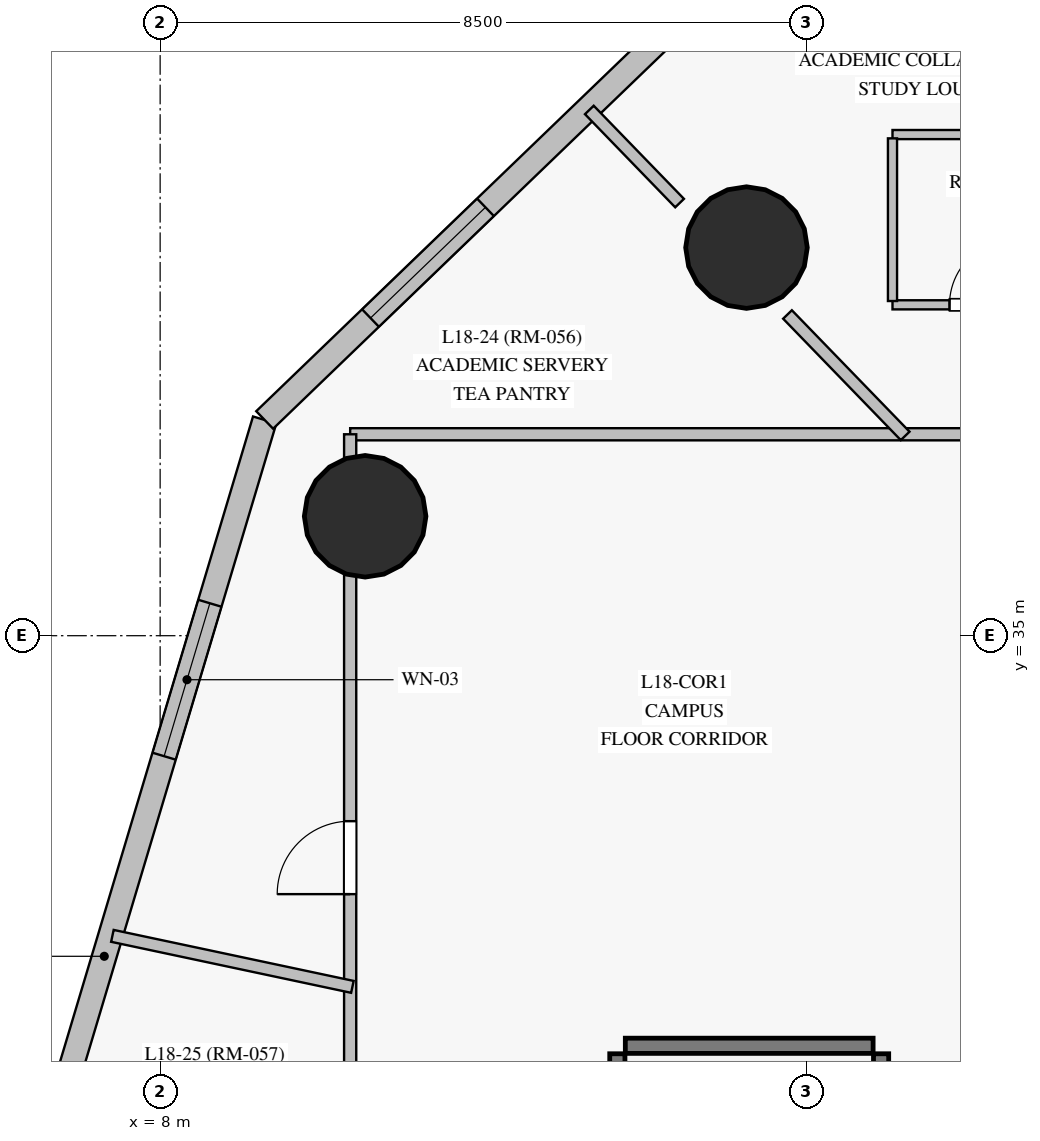
"""IFC4 building model, lengths in metres.
Left out: names, types, materials, properties, quantities, classifications, styles, units other than length and angle.
Written with IfcOpenShell. Run it as: python <this file> out.ifc"""

import sys

from ifc_helpers import new_model, si_unit, direction, frame, frame_2d, origin, origin_with_axes, origin_2d, place, context, subcontext, project, spatial, rectangle, circle, extrude, source, transform, mapped, element, fill, save


model = new_model("IFC4")
c1 = context("Model", 3, precision=1e-05, world=origin(), true_north=direction((0.0, 1.0)))
c2 = subcontext(c1, "Body", "Model", "MODEL_VIEW")
j1 = project(units=[si_unit("LENGTHUNIT", "METRE"), si_unit("PLANEANGLEUNIT", "RADIAN")], contexts=[c1])
p1 = place(None, origin())
s1 = spatial("IfcSite", under=j1, at=p1, CompositionType="ELEMENT")
p2 = place(p1, origin())
s2 = spatial("IfcBuilding", under=s1, at=p2, CompositionType="ELEMENT")
p3 = place(p2, frame((0.0, 0.0, 69.7)))
s3 = spatial("IfcBuildingStorey", under=s2, at=p3, CompositionType="ELEMENT", Elevation=69.7)
m1 = source(origin_with_axes(), c2, "Body", "SweptSolid", [
    extrude(circle(Radius=0.8, at=origin_2d()), origin(), (0.0, 0.0, 1.0), 3.6),
])
for number, where, z_axis, x_axis in (
    (1, (15.714, 40.106, 0.0), (0.0, 0.0, 1.0), (1.0, 0.0, 0.0)),
    (2, (10.697, 36.571, 0.0), (0.0, 0.0, 1.0), (1.0, 0.0, 0.0)),
):
    element("IfcColumn", number, at=place(p3, frame(where, z_axis=z_axis, x_axis=x_axis)), inside=s3, PredefinedType="COLUMN", context=c2, shape_type="MappedRepresentation", body=[
        mapped(m1, transform((0.0, 0.0, 0.0), scale=1.0)),
    ])
p4 = place(p3, frame((9.375, 37.838, 0.0), z_axis=(0.0, 0.0, 1.0), x_axis=(-0.286532715345, -0.958070458284, 0.0)))
e3 = element("IfcWall", 3, at=p4, inside=s3, PredefinedType="SOLIDWALL", context=c2, shape_type="SweptSolid", body=[
    extrude(rectangle(XDim=14.729, YDim=0.32, at=frame_2d((7.365, 0.0))), origin(), (0.0, 0.0, 1.0), 3.35),
])
p5 = place(p4, frame((2.517, 0.0, 0.85)))
e4 = element("IfcOpeningElement", 4, at=p5, cuts=e3, PredefinedType="OPENING", context=c2, shape_type="SweptSolid", body=[
    extrude(rectangle(XDim=2.1, YDim=1.95, at=frame_2d((1.05, 0.975))), frame((0.0, 0.17, 0.0), z_axis=(0.0, -1.0, 0.0), x_axis=(1.0, 0.0, 0.0)), (0.0, 0.0, 1.0), 0.34),
])
p6 = place(p4, frame((9.458, 0.0, 0.85)))
e5 = element("IfcOpeningElement", 5, at=p6, cuts=e3, PredefinedType="OPENING", context=c2, shape_type="SweptSolid", body=[
    extrude(rectangle(XDim=2.1, YDim=1.95, at=frame_2d((1.05, 0.975))), frame((0.0, 0.17, 0.0), z_axis=(0.0, -1.0, 0.0), x_axis=(1.0, 0.0, 0.0)), (0.0, 0.0, 1.0), 0.34),
])
p7 = place(p3, frame((17.891, 46.039, 0.0), z_axis=(0.0, 0.0, 1.0), x_axis=(-0.720301487299, -0.693661132971, 0.0)))
e6 = element("IfcWall", 6, at=p7, inside=s3, PredefinedType="SOLIDWALL", context=c2, shape_type="SweptSolid", body=[
    extrude(rectangle(XDim=11.822, YDim=0.32, at=frame_2d((5.911, 0.0))), origin(), (0.0, 0.0, 1.0), 3.35),
])
p8 = place(p7, frame((1.938, 0.0, 0.85)))
e7 = element("IfcOpeningElement", 7, at=p8, cuts=e6, PredefinedType="OPENING", context=c2, shape_type="SweptSolid", body=[
    extrude(rectangle(XDim=2.1, YDim=1.95, at=frame_2d((1.05, 0.975))), frame((0.0, 0.17, 0.0), z_axis=(0.0, -1.0, 0.0), x_axis=(1.0, 0.0, 0.0)), (0.0, 0.0, 1.0), 0.34),
])
p9 = place(p7, frame((7.789, 0.0, 0.85)))
e8 = element("IfcOpeningElement", 8, at=p9, cuts=e6, PredefinedType="OPENING", context=c2, shape_type="SweptSolid", body=[
    extrude(rectangle(XDim=2.1, YDim=1.95, at=frame_2d((1.05, 0.975))), frame((0.0, 0.17, 0.0), z_axis=(0.0, -1.0, 0.0), x_axis=(1.0, 0.0, 0.0)), (0.0, 0.0, 1.0), 0.34),
])
p10 = place(p3, frame((14.015, 22.15, 0.0), z_axis=(0.0, 0.0, 1.0), x_axis=(0.0, 1.0, 0.0)))
e9 = element("IfcWall", 9, at=p10, inside=s3, PredefinedType="SHEAR", context=c2, shape_type="SweptSolid", body=[
    extrude(rectangle(XDim=7.35, YDim=0.2, at=frame_2d((3.675, 0.0))), origin(), (0.0, 0.0, 1.0), 3.35),
])
p11 = place(p3, frame((17.485, 22.15, 0.0), z_axis=(0.0, 0.0, 1.0), x_axis=(0.0, 1.0, 0.0)))
e10 = element("IfcWall", 10, at=p11, inside=s3, PredefinedType="SHEAR", context=c2, shape_type="SweptSolid", body=[
    extrude(rectangle(XDim=7.35, YDim=0.2, at=frame_2d((3.675, 0.0))), origin(), (0.0, 0.0, 1.0), 3.35),
])
p12 = place(p11, frame((0.35, 0.0, 0.0)))
e11 = element("IfcOpeningElement", 11, at=p12, cuts=e10, PredefinedType="OPENING", context=c2, shape_type="SweptSolid", body=[
    extrude(rectangle(XDim=1.15, YDim=2.15, at=frame_2d((0.575, 1.075))), frame((0.0, 0.11, 0.0), z_axis=(0.0, -1.0, 0.0), x_axis=(1.0, 0.0, 0.0)), (0.0, 0.0, 1.0), 0.22),
])
p13 = place(p3, frame((14.12, 29.605, 0.0), z_axis=(0.0, 0.0, 1.0), x_axis=(1.0, 0.0, 0.0)))
e12 = element("IfcWall", 12, at=p13, inside=s3, PredefinedType="SHEAR", context=c2, shape_type="SweptSolid", body=[
    extrude(rectangle(XDim=3.26, YDim=0.2, at=frame_2d((1.63, 0.0))), origin(), (0.0, 0.0, 1.0), 3.35),
])
p14 = place(p3, frame((10.5, 37.65, 0.0), z_axis=(0.0, 0.0, 1.0), x_axis=(1.0, 0.0, 0.0)))
e13 = element("IfcWall", 13, at=p14, inside=s3, PredefinedType="PARTITIONING", context=c2, shape_type="SweptSolid", body=[
    extrude(rectangle(XDim=29.75, YDim=0.16, at=frame_2d((14.875, 0.0))), origin(), (0.0, 0.0, 1.0), 2.75),
])
p15 = place(p14, frame((27.85, 0.0, 0.0)))
e14 = element("IfcOpeningElement", 14, at=p15, cuts=e13, PredefinedType="OPENING", context=c2, shape_type="SweptSolid", body=[
    extrude(rectangle(XDim=0.95, YDim=2.15, at=frame_2d((0.475, 1.075))), frame((0.0, 0.09, 0.0), z_axis=(0.0, -1.0, 0.0), x_axis=(1.0, 0.0, 0.0)), (0.0, 0.0, 1.0), 0.18),
])
p16 = place(p14, frame((25.159, 0.0, 0.0)))
e15 = element("IfcOpeningElement", 15, at=p16, cuts=e13, PredefinedType="OPENING", context=c2, shape_type="SweptSolid", body=[
    extrude(rectangle(XDim=0.96, YDim=2.15, at=frame_2d((0.48, 1.075))), frame((0.0, 0.09, 0.0), z_axis=(0.0, -1.0, 0.0), x_axis=(1.0, 0.0, 0.0)), (0.0, 0.0, 1.0), 0.18),
])
p17 = place(p14, frame((21.837, 0.0, 0.0)))
e16 = element("IfcOpeningElement", 16, at=p17, cuts=e13, PredefinedType="OPENING", context=c2, shape_type="SweptSolid", body=[
    extrude(rectangle(XDim=0.95, YDim=2.15, at=frame_2d((0.475, 1.075))), frame((0.0, 0.09, 0.0), z_axis=(0.0, -1.0, 0.0), x_axis=(1.0, 0.0, 0.0)), (0.0, 0.0, 1.0), 0.18),
])
p18 = place(p14, frame((18.863, 0.0, 0.0)))
e17 = element("IfcOpeningElement", 17, at=p18, cuts=e13, PredefinedType="OPENING", context=c2, shape_type="SweptSolid", body=[
    extrude(rectangle(XDim=0.95, YDim=2.15, at=frame_2d((0.475, 1.075))), frame((0.0, 0.09, 0.0), z_axis=(0.0, -1.0, 0.0), x_axis=(1.0, 0.0, 0.0)), (0.0, 0.0, 1.0), 0.18),
])
p19 = place(p14, frame((15.14, 0.0, 0.0)))
e18 = element("IfcOpeningElement", 18, at=p19, cuts=e13, PredefinedType="OPENING", context=c2, shape_type="SweptSolid", body=[
    extrude(rectangle(XDim=0.96, YDim=2.15, at=frame_2d((0.48, 1.075))), frame((0.0, 0.09, 0.0), z_axis=(0.0, -1.0, 0.0), x_axis=(1.0, 0.0, 0.0)), (0.0, 0.0, 1.0), 0.18),
])
p20 = place(p14, frame((13.174, 0.0, 0.0)))
e19 = element("IfcOpeningElement", 19, at=p20, cuts=e13, PredefinedType="OPENING", context=c2, shape_type="SweptSolid", body=[
    extrude(rectangle(XDim=0.95, YDim=2.15, at=frame_2d((0.475, 1.075))), frame((0.0, 0.09, 0.0), z_axis=(0.0, -1.0, 0.0), x_axis=(1.0, 0.0, 0.0)), (0.0, 0.0, 1.0), 0.18),
])
p21 = place(p14, frame((9.938, 0.0, 0.0)))
e20 = element("IfcOpeningElement", 20, at=p21, cuts=e13, PredefinedType="OPENING", context=c2, shape_type="SweptSolid", body=[
    extrude(rectangle(XDim=0.95, YDim=2.15, at=frame_2d((0.475, 1.075))), frame((0.0, 0.09, 0.0), z_axis=(0.0, -1.0, 0.0), x_axis=(1.0, 0.0, 0.0)), (0.0, 0.0, 1.0), 0.18),
])
p22 = place(p3, frame((10.5, 15.35, 0.0), z_axis=(0.0, 0.0, 1.0), x_axis=(0.0, 1.0, 0.0)))
e21 = element("IfcWall", 21, at=p22, inside=s3, PredefinedType="PARTITIONING", context=c2, shape_type="SweptSolid", body=[
    extrude(rectangle(XDim=22.3, YDim=0.16, at=frame_2d((11.15, 0.0))), origin(), (0.0, 0.0, 1.0), 2.75),
])
p23 = place(p22, frame((7.33, 0.0, 0.0)))
e22 = element("IfcOpeningElement", 22, at=p23, cuts=e21, PredefinedType="OPENING", context=c2, shape_type="SweptSolid", body=[
    extrude(rectangle(XDim=0.95, YDim=2.15, at=frame_2d((0.475, 1.075))), frame((0.0, 0.09, 0.0), z_axis=(0.0, -1.0, 0.0), x_axis=(1.0, 0.0, 0.0)), (0.0, 0.0, 1.0), 0.18),
])
p24 = place(p22, frame((16.25, 0.0, 0.0)))
e23 = element("IfcOpeningElement", 23, at=p24, cuts=e21, PredefinedType="OPENING", context=c2, shape_type="SweptSolid", body=[
    extrude(rectangle(XDim=0.96, YDim=2.15, at=frame_2d((0.48, 1.075))), frame((0.0, 0.09, 0.0), z_axis=(0.0, -1.0, 0.0), x_axis=(1.0, 0.0, 0.0)), (0.0, 0.0, 1.0), 0.18),
])
p25 = place(p22, frame((10.675, 0.0, 0.0)))
e24 = element("IfcOpeningElement", 24, at=p25, cuts=e21, PredefinedType="OPENING", context=c2, shape_type="SweptSolid", body=[
    extrude(rectangle(XDim=0.95, YDim=2.15, at=frame_2d((0.475, 1.075))), frame((0.0, 0.09, 0.0), z_axis=(0.0, -1.0, 0.0), x_axis=(1.0, 0.0, 0.0)), (0.0, 0.0, 1.0), 0.18),
])
p26 = place(p3, frame((10.529, 30.38, 0.0), z_axis=(0.0, 0.0, 1.0), x_axis=(-0.978162887363, 0.207839759876, 0.0)))
e25 = element("IfcWall", 25, at=p26, inside=s3, PredefinedType="PARTITIONING", context=c2, shape_type="SweptSolid", body=[
    extrude(rectangle(XDim=3.228, YDim=0.16, at=frame_2d((1.614, 0.0))), origin(), (0.0, 0.0, 1.0), 3.35),
])
p27 = place(p3, frame((17.635, 39.353, 0.0), z_axis=(0.0, 0.0, 1.0), x_axis=(1.0, 0.0, 0.0)))
e26 = element("IfcWall", 26, at=p27, inside=s3, PredefinedType="PARTITIONING", context=c2, shape_type="SweptSolid", body=[
    extrude(rectangle(XDim=2.36, YDim=0.12, at=frame_2d((1.18, 0.0))), origin(), (0.0, 0.0, 1.0), 2.75),
])
p28 = place(p27, frame((0.75, 0.0, 0.0)))
e27 = element("IfcOpeningElement", 27, at=p28, cuts=e26, PredefinedType="OPENING", context=c2, shape_type="SweptSolid", body=[
    extrude(rectangle(XDim=0.86, YDim=2.1, at=frame_2d((0.43, 1.05))), frame((0.0, 0.07, 0.0), z_axis=(0.0, -1.0, 0.0), x_axis=(1.0, 0.0, 0.0)), (0.0, 0.0, 1.0), 0.14),
])
p29 = place(p3, frame((19.995, 41.593, 0.0), z_axis=(0.0, 0.0, 1.0), x_axis=(-1.0, 0.0, 0.0)))
e28 = element("IfcWall", 28, at=p29, inside=s3, PredefinedType="PARTITIONING", context=c2, shape_type="SweptSolid", body=[
    extrude(rectangle(XDim=2.36, YDim=0.12, at=frame_2d((1.18, 0.0))), origin(), (0.0, 0.0, 1.0), 2.75),
])
p30 = place(p3, frame((17.802, 37.628, 0.0), z_axis=(0.0, 0.0, 1.0), x_axis=(-0.695823523946, 0.718212798218, 0.0)))
e29 = element("IfcWall", 29, at=p30, inside=s3, PredefinedType="PARTITIONING", context=c2, shape_type="SweptSolid", body=[
    extrude(rectangle(XDim=2.225, YDim=0.16, at=frame_2d((1.112, 0.0))), origin(), (0.0, 0.0, 1.0), 2.7),
])
p31 = place(p3, frame((17.635, 41.543, 0.0), z_axis=(0.0, 0.0, 1.0), x_axis=(0.0, -1.0, 0.0)))
e30 = element("IfcWall", 30, at=p31, inside=s3, PredefinedType="PARTITIONING", context=c2, shape_type="SweptSolid", body=[
    extrude(rectangle(XDim=2.14, YDim=0.12, at=frame_2d((1.07, 0.0))), origin(), (0.0, 0.0, 1.0), 3.35),
])
p32 = place(p3, frame((14.834, 40.691, 0.0), z_axis=(0.0, 0.0, 1.0), x_axis=(-0.695931289597, 0.718108376333, 0.0)))
e31 = element("IfcWall", 31, at=p32, inside=s3, PredefinedType="PARTITIONING", context=c2, shape_type="SweptSolid", body=[
    extrude(rectangle(XDim=1.706, YDim=0.16, at=frame_2d((0.853, 0.0))), origin(), (0.0, 0.0, 1.0), 3.35),
])
m2 = source(origin_with_axes(), c2, "Body", "SweptSolid", [
    extrude(rectangle(XDim=2.1, YDim=1.95, at=frame_2d((1.05, 0.975))), frame((0.0, 0.03, 0.0), z_axis=(0.0, -1.0, 0.0), x_axis=(1.0, 0.0, 0.0)), (0.0, 0.0, 1.0), 0.06),
])
p33 = place(p5, origin())
e32 = element("IfcWindow", 32, at=p33, inside=s3, PartitioningType="SINGLE_PANEL", PredefinedType="WINDOW", context=c2, shape_type="MappedRepresentation", body=[
    mapped(m2, transform((0.0, 0.0, 0.0), scale=1.0)),
])
fill(e4, e32)
p34 = place(p9, origin())
e33 = element("IfcWindow", 33, at=p34, inside=s3, PartitioningType="SINGLE_PANEL", PredefinedType="WINDOW", context=c2, shape_type="MappedRepresentation", body=[
    mapped(m2, transform((0.0, 0.0, 0.0), scale=1.0)),
])
fill(e8, e33)
m3 = source(origin_with_axes(), c2, "Body", "SweptSolid", [
    extrude(rectangle(XDim=0.86, YDim=2.1, at=frame_2d((0.43, 1.05))), frame((0.0, 0.025, 0.0), z_axis=(0.0, -1.0, 0.0), x_axis=(1.0, 0.0, 0.0)), (0.0, 0.0, 1.0), 0.05),
])
p35 = place(p28, origin())
e34 = element("IfcDoor", 34, at=p35, inside=s3, OperationType="SINGLE_SWING_RIGHT", PredefinedType="DOOR", context=c2, shape_type="MappedRepresentation", body=[
    mapped(m3, transform((0.0, 0.0, 0.0), scale=1.0)),
])
fill(e27, e34)
m4 = source(origin_with_axes(), c2, "Body", "SweptSolid", [
    extrude(rectangle(XDim=0.96, YDim=2.15, at=frame_2d((0.48, 1.075))), frame((0.0, 0.025, 0.0), z_axis=(0.0, -1.0, 0.0), x_axis=(1.0, 0.0, 0.0)), (0.0, 0.0, 1.0), 0.05),
])
p36 = place(p24, origin())
e35 = element("IfcDoor", 35, at=p36, inside=s3, OperationType="SINGLE_SWING_LEFT", PredefinedType="DOOR", context=c2, shape_type="MappedRepresentation", body=[
    mapped(m4, transform((0.0, 0.0, 0.0), scale=1.0)),
])
fill(e23, e35)
save(model, sys.argv[1])
